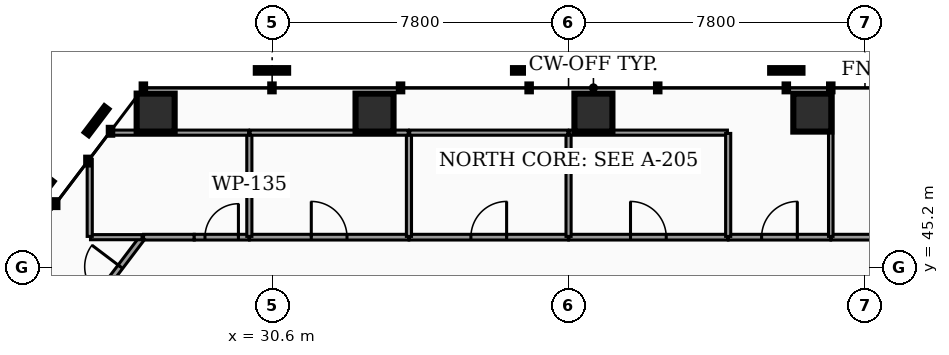
"""IFC4 building model, lengths in metres.
Left out: names, types, materials, properties, quantities, classifications, styles, units other than length and angle.
Written with IfcOpenShell. Run it as: python <this file> out.ifc"""

import sys

from ifc_helpers import new_model, si_unit, direction, frame, frame_2d, origin, origin_2d, place, context, subcontext, project, spatial, rectangle, hollow_rectangle, extrude, element, fill, save


model = new_model("IFC4")
c1 = context("Model", 3, precision=1e-05, world=origin(), true_north=direction((0.0, 1.0)))
c2 = subcontext(c1, "Body", "Model", "MODEL_VIEW")
j1 = project(units=[si_unit("LENGTHUNIT", "METRE"), si_unit("PLANEANGLEUNIT", "RADIAN")], contexts=[c1])
p1 = place(None, origin())
s1 = spatial("IfcSite", under=j1, at=p1, CompositionType="ELEMENT")
p2 = place(p1, origin())
s2 = spatial("IfcBuilding", under=s1, at=p2, CompositionType="ELEMENT")
p3 = place(p2, frame((0.0, 0.0, 52.02)))
s3 = spatial("IfcBuildingStorey", under=s2, at=p3, CompositionType="ELEMENT", Elevation=52.02)
for number, where, z_axis, x_axis in (
    (1, (44.814, 49.278, 0.0), (0.0, 0.0, 1.0), (1.0, 0.0, 0.0)),
    (2, (39.054, 49.278, 0.0), (0.0, 0.0, 1.0), (1.0, 0.0, 0.0)),
    (3, (33.294, 49.278, 0.0), (0.0, 0.0, 1.0), (1.0, 0.0, 0.0)),
    (4, (27.534, 49.278, 0.0), (0.0, 0.0, 1.0), (1.0, 0.0, 0.0)),
):
    element("IfcColumn", number, at=place(p3, frame(where, z_axis=z_axis, x_axis=x_axis)), inside=s3, PredefinedType="COLUMN", context=c2, shape_type="SweptSolid", body=[
        extrude(hollow_rectangle(XDim=1.0, YDim=1.0, WallThickness=0.05, at=origin_2d()), origin(), (0.0, 0.0, 1.0), 3.82),
    ])
p4 = place(p3, frame((27.217, 46.0, 0.0), z_axis=(0.0, 0.0, 1.0), x_axis=(1.0, 0.0, 0.0)))
e5 = element("IfcWall", 5, at=p4, inside=s3, PredefinedType="PARTITIONING", context=c2, shape_type="SweptSolid", body=[
    extrude(rectangle(XDim=1.333, YDim=0.15, at=frame_2d((0.667, 0.0))), origin(), (0.0, 0.0, 1.0), 2.777),
])
p5 = place(p3, frame((28.55, 46.0, 0.0), z_axis=(0.0, 0.0, 1.0), x_axis=(1.0, 0.0, 0.0)))
e6 = element("IfcWall", 6, at=p5, inside=s3, PredefinedType="PARTITIONING", context=c2, shape_type="SweptSolid", body=[
    extrude(rectangle(XDim=1.445, YDim=0.15, at=frame_2d((0.723, 0.0))), origin(), (0.0, 0.0, 1.0), 2.777),
])
p6 = place(p5, frame((0.282, 0.0, 0.0)))
e7 = element("IfcOpeningElement", 7, at=p6, cuts=e6, PredefinedType="OPENING", context=c2, shape_type="SweptSolid", body=[
    extrude(rectangle(XDim=0.88, YDim=2.05, at=frame_2d((0.44, 1.025))), frame((0.0, 0.085, 0.0), z_axis=(0.0, -1.0, 0.0), x_axis=(1.0, 0.0, 0.0)), (0.0, 0.0, 1.0), 0.17),
])
p7 = place(p3, frame((30.005, 46.0, 0.0), z_axis=(0.0, 0.0, 1.0), x_axis=(1.0, 0.0, 0.0)))
e8 = element("IfcWall", 8, at=p7, inside=s3, PredefinedType="PARTITIONING", context=c2, shape_type="SweptSolid", body=[
    extrude(rectangle(XDim=4.19, YDim=0.15, at=frame_2d((2.095, 0.0))), origin(), (0.0, 0.0, 1.0), 2.777),
])
p8 = place(p7, frame((1.625, 0.0, 0.0)))
e9 = element("IfcOpeningElement", 9, at=p8, cuts=e8, PredefinedType="OPENING", context=c2, shape_type="SweptSolid", body=[
    extrude(rectangle(XDim=0.94, YDim=2.05, at=frame_2d((0.47, 1.025))), frame((0.0, 0.085, 0.0), z_axis=(0.0, -1.0, 0.0), x_axis=(1.0, 0.0, 0.0)), (0.0, 0.0, 1.0), 0.17),
])
p9 = place(p3, frame((34.205, 46.0, 0.0), z_axis=(0.0, 0.0, 1.0), x_axis=(1.0, 0.0, 0.0)))
e10 = element("IfcWall", 10, at=p9, inside=s3, PredefinedType="PARTITIONING", context=c2, shape_type="SweptSolid", body=[
    extrude(rectangle(XDim=4.19, YDim=0.15, at=frame_2d((2.095, 0.0))), origin(), (0.0, 0.0, 1.0), 2.777),
])
p10 = place(p9, frame((1.625, 0.0, 0.0)))
e11 = element("IfcOpeningElement", 11, at=p10, cuts=e10, PredefinedType="OPENING", context=c2, shape_type="SweptSolid", body=[
    extrude(rectangle(XDim=0.94, YDim=2.05, at=frame_2d((0.47, 1.025))), frame((0.0, 0.085, 0.0), z_axis=(0.0, -1.0, 0.0), x_axis=(1.0, 0.0, 0.0)), (0.0, 0.0, 1.0), 0.17),
])
p11 = place(p3, frame((38.405, 46.0, 0.0), z_axis=(0.0, 0.0, 1.0), x_axis=(1.0, 0.0, 0.0)))
e12 = element("IfcWall", 12, at=p11, inside=s3, PredefinedType="PARTITIONING", context=c2, shape_type="SweptSolid", body=[
    extrude(rectangle(XDim=4.19, YDim=0.15, at=frame_2d((2.095, 0.0))), origin(), (0.0, 0.0, 1.0), 2.777),
])
p12 = place(p11, frame((1.625, 0.0, 0.0)))
e13 = element("IfcOpeningElement", 13, at=p12, cuts=e12, PredefinedType="OPENING", context=c2, shape_type="SweptSolid", body=[
    extrude(rectangle(XDim=0.94, YDim=2.05, at=frame_2d((0.47, 1.025))), frame((0.0, 0.085, 0.0), z_axis=(0.0, -1.0, 0.0), x_axis=(1.0, 0.0, 0.0)), (0.0, 0.0, 1.0), 0.17),
])
p13 = place(p3, frame((25.462, 43.71, 0.0), z_axis=(0.0, 0.0, 1.0), x_axis=(0.603800014115, 0.797135837204, 0.0)))
e14 = element("IfcWall", 14, at=p13, inside=s3, PredefinedType="PARTITIONING", context=c2, shape_type="SweptSolid", body=[
    extrude(rectangle(XDim=2.853, YDim=0.15, at=frame_2d((1.426, 0.0))), origin(), (0.0, 0.0, 1.0), 2.777),
])
p14 = place(p13, frame((0.956, 0.0, 0.0)))
e15 = element("IfcOpeningElement", 15, at=p14, cuts=e14, PredefinedType="OPENING", context=c2, shape_type="SweptSolid", body=[
    extrude(rectangle(XDim=0.94, YDim=2.05, at=frame_2d((0.47, 1.025))), frame((0.0, 0.085, 0.0), z_axis=(0.0, -1.0, 0.0), x_axis=(1.0, 0.0, 0.0)), (0.0, 0.0, 1.0), 0.17),
])
p15 = place(p3, frame((45.305, 46.0, 0.0), z_axis=(0.0, 0.0, 1.0), x_axis=(1.0, 0.0, 0.0)))
e16 = element("IfcWall", 16, at=p15, inside=s3, PredefinedType="PARTITIONING", context=c2, shape_type="SweptSolid", body=[
    extrude(rectangle(XDim=3.045, YDim=0.15, at=frame_2d((1.522, 0.0))), origin(), (0.0, 0.0, 1.0), 2.777),
])
p16 = place(p3, frame((42.605, 46.0, 0.0), z_axis=(0.0, 0.0, 1.0), x_axis=(1.0, 0.0, 0.0)))
e17 = element("IfcWall", 17, at=p16, inside=s3, PredefinedType="PARTITIONING", context=c2, shape_type="SweptSolid", body=[
    extrude(rectangle(XDim=2.69, YDim=0.15, at=frame_2d((1.345, 0.0))), origin(), (0.0, 0.0, 1.0), 2.777),
])
p17 = place(p16, frame((0.875, 0.0, 0.0)))
e18 = element("IfcOpeningElement", 18, at=p17, cuts=e17, PredefinedType="OPENING", context=c2, shape_type="SweptSolid", body=[
    extrude(rectangle(XDim=0.94, YDim=2.05, at=frame_2d((0.47, 1.025))), frame((0.0, 0.085, 0.0), z_axis=(0.0, -1.0, 0.0), x_axis=(1.0, 0.0, 0.0)), (0.0, 0.0, 1.0), 0.17),
])
p18 = place(p3, frame((30.0, 46.02, 0.0), z_axis=(0.0, 0.0, 1.0), x_axis=(0.0, 1.0, 0.0)))
e19 = element("IfcWall", 19, at=p18, inside=s3, PredefinedType="PARTITIONING", context=c2, shape_type="SweptSolid", body=[
    extrude(rectangle(XDim=2.71, YDim=0.135, at=frame_2d((1.355, 0.0))), origin(), (0.0, 0.0, 1.0), 2.777),
])
p19 = place(p3, frame((25.82, 46.0, 0.0), z_axis=(0.0, 0.0, 1.0), x_axis=(1.0, 0.0, 0.0)))
e20 = element("IfcWall", 20, at=p19, inside=s3, PredefinedType="PARTITIONING", context=c2, shape_type="SweptSolid", body=[
    extrude(rectangle(XDim=1.356, YDim=0.135, at=frame_2d((0.678, 0.0))), origin(), (0.0, 0.0, 1.0), 2.777),
])
p20 = place(p3, frame((25.8, 46.02, 0.0), z_axis=(0.0, 0.0, 1.0), x_axis=(0.0, 1.0, 0.0)))
e21 = element("IfcWall", 21, at=p20, inside=s3, PredefinedType="PARTITIONING", context=c2, shape_type="SweptSolid", body=[
    extrude(rectangle(XDim=2.03, YDim=0.135, at=frame_2d((1.015, 0.0))), origin(), (0.0, 0.0, 1.0), 2.777),
])
p21 = place(p3, frame((26.334, 48.75, 0.0), z_axis=(0.0, 0.0, 1.0), x_axis=(1.0, 0.0, 0.0)))
e22 = element("IfcWall", 22, at=p21, inside=s3, PredefinedType="PARTITIONING", context=c2, shape_type="SweptSolid", body=[
    extrude(rectangle(XDim=3.646, YDim=0.135, at=frame_2d((1.823, 0.0))), origin(), (0.0, 0.0, 1.0), 2.777),
])
p22 = place(p3, frame((34.2, 46.02, 0.0), z_axis=(0.0, 0.0, 1.0), x_axis=(0.0, 1.0, 0.0)))
e23 = element("IfcWall", 23, at=p22, inside=s3, PredefinedType="PARTITIONING", context=c2, shape_type="SweptSolid", body=[
    extrude(rectangle(XDim=2.71, YDim=0.135, at=frame_2d((1.355, 0.0))), origin(), (0.0, 0.0, 1.0), 2.777),
])
p23 = place(p3, frame((30.02, 48.75, 0.0), z_axis=(0.0, 0.0, 1.0), x_axis=(1.0, 0.0, 0.0)))
e24 = element("IfcWall", 24, at=p23, inside=s3, PredefinedType="PARTITIONING", context=c2, shape_type="SweptSolid", body=[
    extrude(rectangle(XDim=4.16, YDim=0.135, at=frame_2d((2.08, 0.0))), origin(), (0.0, 0.0, 1.0), 2.777),
])
p24 = place(p3, frame((38.4, 46.02, 0.0), z_axis=(0.0, 0.0, 1.0), x_axis=(0.0, 1.0, 0.0)))
e25 = element("IfcWall", 25, at=p24, inside=s3, PredefinedType="PARTITIONING", context=c2, shape_type="SweptSolid", body=[
    extrude(rectangle(XDim=2.71, YDim=0.135, at=frame_2d((1.355, 0.0))), origin(), (0.0, 0.0, 1.0), 2.777),
])
p25 = place(p3, frame((34.22, 48.75, 0.0), z_axis=(0.0, 0.0, 1.0), x_axis=(1.0, 0.0, 0.0)))
e26 = element("IfcWall", 26, at=p25, inside=s3, PredefinedType="PARTITIONING", context=c2, shape_type="SweptSolid", body=[
    extrude(rectangle(XDim=4.16, YDim=0.135, at=frame_2d((2.08, 0.0))), origin(), (0.0, 0.0, 1.0), 2.777),
])
p26 = place(p3, frame((38.42, 48.75, 0.0), z_axis=(0.0, 0.0, 1.0), x_axis=(1.0, 0.0, 0.0)))
e27 = element("IfcWall", 27, at=p26, inside=s3, PredefinedType="PARTITIONING", context=c2, shape_type="SweptSolid", body=[
    extrude(rectangle(XDim=4.16, YDim=0.135, at=frame_2d((2.08, 0.0))), origin(), (0.0, 0.0, 1.0), 2.777),
])
p27 = place(p3, frame((42.6, 46.02, 0.0), z_axis=(0.0, 0.0, 1.0), x_axis=(0.0, 1.0, 0.0)))
e28 = element("IfcWall", 28, at=p27, inside=s3, PredefinedType="PARTITIONING", context=c2, shape_type="SweptSolid", body=[
    extrude(rectangle(XDim=2.71, YDim=0.135, at=frame_2d((1.355, 0.0))), origin(), (0.0, 0.0, 1.0), 2.777),
])
p28 = place(p3, frame((45.3, 46.02, 0.0), z_axis=(0.0, 0.0, 1.0), x_axis=(0.0, 1.0, 0.0)))
e29 = element("IfcWall", 29, at=p28, inside=s3, PredefinedType="PARTITIONING", context=c2, shape_type="SweptSolid", body=[
    extrude(rectangle(XDim=3.893, YDim=0.12, at=frame_2d((1.946, 0.0))), origin(), (0.0, 0.0, 1.0), 2.777),
])
p29 = place(p6, origin())
e30 = element("IfcDoor", 30, at=p29, inside=s3, OperationType="SINGLE_SWING_RIGHT", PredefinedType="DOOR", context=c2, shape_type="SweptSolid", body=[
    extrude(rectangle(XDim=0.88, YDim=2.05, at=frame_2d((0.44, 1.025))), frame((0.0, 0.025, 0.0), z_axis=(0.0, -1.0, 0.0), x_axis=(1.0, 0.0, 0.0)), (0.0, 0.0, 1.0), 0.05),
])
fill(e7, e30)
p30 = place(p8, origin())
e31 = element("IfcDoor", 31, at=p30, inside=s3, OperationType="SINGLE_SWING_LEFT", PredefinedType="DOOR", context=c2, shape_type="SweptSolid", body=[
    extrude(rectangle(XDim=0.94, YDim=2.05, at=frame_2d((0.47, 1.025))), frame((0.0, 0.025, 0.0), z_axis=(0.0, -1.0, 0.0), x_axis=(1.0, 0.0, 0.0)), (0.0, 0.0, 1.0), 0.05),
])
fill(e9, e31)
p31 = place(p10, origin())
e32 = element("IfcDoor", 32, at=p31, inside=s3, OperationType="SINGLE_SWING_RIGHT", PredefinedType="DOOR", context=c2, shape_type="SweptSolid", body=[
    extrude(rectangle(XDim=0.94, YDim=2.05, at=frame_2d((0.47, 1.025))), frame((0.0, 0.025, 0.0), z_axis=(0.0, -1.0, 0.0), x_axis=(1.0, 0.0, 0.0)), (0.0, 0.0, 1.0), 0.05),
])
fill(e11, e32)
p32 = place(p12, origin())
e33 = element("IfcDoor", 33, at=p32, inside=s3, OperationType="SINGLE_SWING_LEFT", PredefinedType="DOOR", context=c2, shape_type="SweptSolid", body=[
    extrude(rectangle(XDim=0.94, YDim=2.05, at=frame_2d((0.47, 1.025))), frame((0.0, 0.025, 0.0), z_axis=(0.0, -1.0, 0.0), x_axis=(1.0, 0.0, 0.0)), (0.0, 0.0, 1.0), 0.05),
])
fill(e13, e33)
p33 = place(p14, origin())
e34 = element("IfcDoor", 34, at=p33, inside=s3, OperationType="SINGLE_SWING_RIGHT", PredefinedType="DOOR", context=c2, shape_type="SweptSolid", body=[
    extrude(rectangle(XDim=0.94, YDim=2.05, at=frame_2d((0.47, 1.025))), frame((0.0, 0.025, 0.0), z_axis=(0.0, -1.0, 0.0), x_axis=(1.0, 0.0, 0.0)), (0.0, 0.0, 1.0), 0.05),
])
fill(e15, e34)
p34 = place(p17, origin())
e35 = element("IfcDoor", 35, at=p34, inside=s3, OperationType="SINGLE_SWING_RIGHT", PredefinedType="DOOR", context=c2, shape_type="SweptSolid", body=[
    extrude(rectangle(XDim=0.94, YDim=2.05, at=frame_2d((0.47, 1.025))), frame((0.0, 0.025, 0.0), z_axis=(0.0, -1.0, 0.0), x_axis=(1.0, 0.0, 0.0)), (0.0, 0.0, 1.0), 0.05),
])
fill(e18, e35)
save(model, sys.argv[1])
